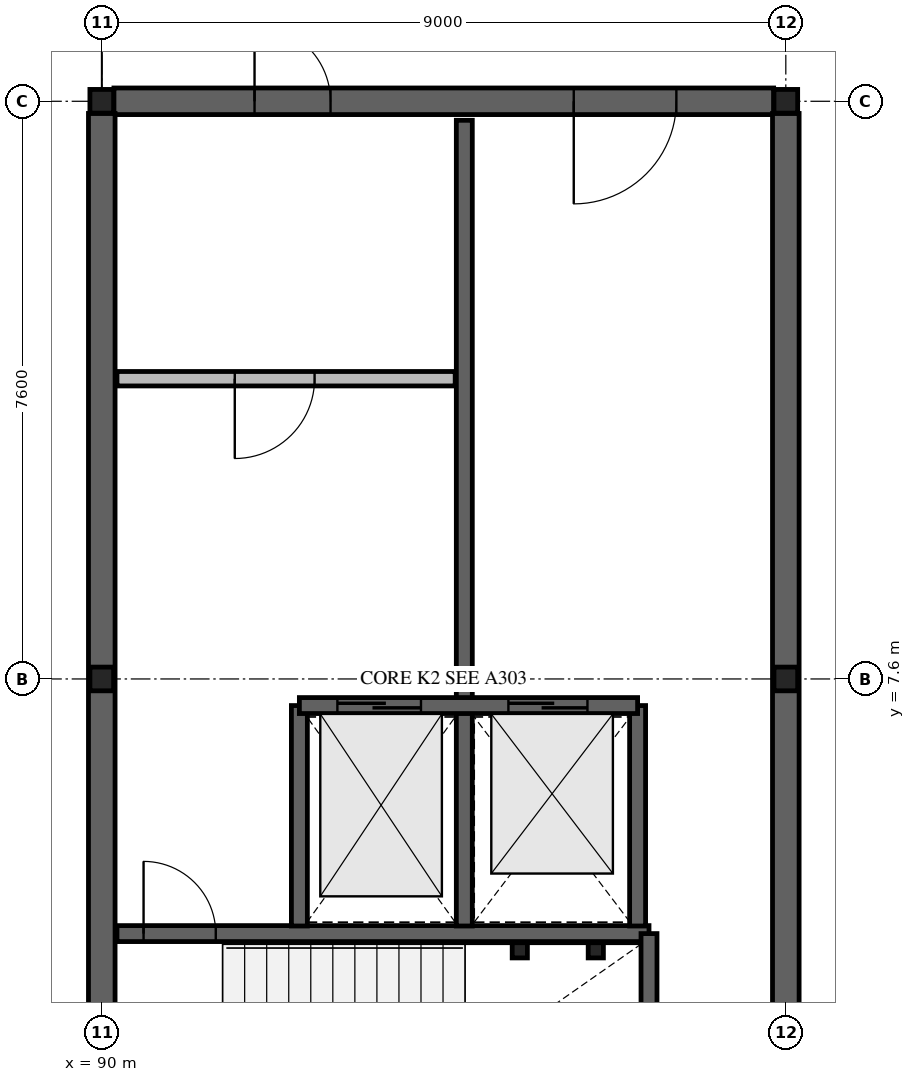
"""IFC4 building model, lengths in metres.
Left out: names, types, materials, properties, quantities, classifications, styles, units other than length and angle.
Written with IfcOpenShell. Run it as: python <this file> out.ifc"""

import sys

from ifc_helpers import new_model, si_unit, direction, frame, frame_2d, origin, origin_2d, place, context, subcontext, project, spatial, rectangle, hollow_rectangle, i_section, extrude, element, fill, save


model = new_model("IFC4")
c1 = context("Model", 3, precision=1e-05, world=origin(), true_north=direction((0.0, 1.0)))
c2 = subcontext(c1, "Body", "Model", "MODEL_VIEW")
j1 = project(units=[si_unit("LENGTHUNIT", "METRE"), si_unit("PLANEANGLEUNIT", "RADIAN")], contexts=[c1])
p1 = place(None, origin())
s1 = spatial("IfcSite", under=j1, at=p1, CompositionType="ELEMENT")
p2 = place(p1, origin())
s2 = spatial("IfcBuilding", under=s1, at=p2, CompositionType="ELEMENT")
p3 = place(p2, frame((0.0, 0.0, 9.36)))
s3 = spatial("IfcBuildingStorey", under=s2, at=p3, CompositionType="ELEMENT", Elevation=9.36)
for number, where, z_axis, x_axis in (
    (1, (90.0, 7.6, 0.0), (0.0, 0.0, 1.0), (1.0, 0.0, 0.0)),
    (2, (90.0, 15.2, 0.0), (0.0, 0.0, 1.0), (1.0, 0.0, 0.0)),
    (3, (99.0, 7.6, 0.0), (0.0, 0.0, 1.0), (1.0, 0.0, 0.0)),
    (4, (99.0, 15.2, 0.0), (0.0, 0.0, 1.0), (1.0, 0.0, 0.0)),
):
    element("IfcColumn", number, at=place(p3, frame(where, z_axis=z_axis, x_axis=x_axis)), inside=s3, PredefinedType="COLUMN", context=c2, shape_type="SweptSolid", body=[
        extrude(i_section(OverallWidth=0.312, OverallDepth=0.312, WebThickness=0.017, FlangeThickness=0.017, FilletRadius=0.015, at=origin_2d()), origin(), (0.0, 0.0, 1.0), 4.32),
    ])
p4 = place(p3, frame((90.16, 15.2, 0.0), z_axis=(0.0, 0.0, 1.0), x_axis=(1.0, 0.0, 0.0)))
e5 = element("IfcWall", 5, at=p4, inside=s3, PredefinedType="SHEAR", context=c2, shape_type="SweptSolid", body=[
    extrude(rectangle(XDim=8.68, YDim=0.35, at=frame_2d((4.34, 0.0))), origin(), (0.0, 0.0, 1.0), 4.04),
])
p5 = place(p4, frame((1.85, 0.0, 0.0)))
e6 = element("IfcOpeningElement", 6, at=p5, cuts=e5, PredefinedType="OPENING", context=c2, shape_type="SweptSolid", body=[
    extrude(rectangle(XDim=1.0, YDim=2.15, at=frame_2d((0.5, 1.075))), frame((0.0, 0.185, 0.0), z_axis=(0.0, -1.0, 0.0), x_axis=(1.0, 0.0, 0.0)), (0.0, 0.0, 1.0), 0.37),
])
p6 = place(p4, frame((6.05, 0.0, 0.0)))
e7 = element("IfcOpeningElement", 7, at=p6, cuts=e5, PredefinedType="OPENING", context=c2, shape_type="SweptSolid", body=[
    extrude(rectangle(XDim=1.35, YDim=2.18, at=frame_2d((0.675, 1.09))), frame((0.0, 0.185, 0.0), z_axis=(0.0, -1.0, 0.0), x_axis=(1.0, 0.0, 0.0)), (0.0, 0.0, 1.0), 0.37),
])
for number, where, z_axis, x_axis in (
    (8, (90.0, 0.16, 0.0), (0.0, 0.0, 1.0), (0.0, 1.0, 0.0)),
    (9, (99.0, 0.16, 0.0), (0.0, 0.0, 1.0), (0.0, 1.0, 0.0)),
):
    element("IfcWall", number, at=place(p3, frame(where, z_axis=z_axis, x_axis=x_axis)), inside=s3, PredefinedType="SHEAR", context=c2, shape_type="SweptSolid", body=[
        extrude(rectangle(XDim=14.88, YDim=0.35, at=frame_2d((7.44, 0.0))), origin(), (0.0, 0.0, 1.0), 4.04),
    ])
p7 = place(p3, frame((90.2, 4.25, 0.0), z_axis=(0.0, 0.0, 1.0), x_axis=(1.0, 0.0, 0.0)))
e10 = element("IfcWall", 10, at=p7, inside=s3, PredefinedType="SOLIDWALL", context=c2, shape_type="SweptSolid", body=[
    extrude(rectangle(XDim=7.0, YDim=0.21, at=frame_2d((3.5, 0.0))), origin(), (0.0, 0.0, 1.0), 4.04),
])
p8 = place(p7, frame((0.35, 0.0, 0.0)))
e11 = element("IfcOpeningElement", 11, at=p8, cuts=e10, PredefinedType="OPENING", context=c2, shape_type="SweptSolid", body=[
    extrude(rectangle(XDim=0.95, YDim=2.12, at=frame_2d((0.475, 1.06))), frame((0.0, 0.115, 0.0), z_axis=(0.0, -1.0, 0.0), x_axis=(1.0, 0.0, 0.0)), (0.0, 0.0, 1.0), 0.23),
])
p9 = place(p3, frame((97.2, 0.2, 0.0), z_axis=(0.0, 0.0, 1.0), x_axis=(0.0, 1.0, 0.0)))
e12 = element("IfcWall", 12, at=p9, inside=s3, PredefinedType="SOLIDWALL", context=c2, shape_type="SweptSolid", body=[
    extrude(rectangle(XDim=4.05, YDim=0.21, at=frame_2d((2.025, 0.0))), origin(), (0.0, 0.0, 1.0), 4.04),
])
p10 = place(p3, frame((92.6, 4.35, 0.0), z_axis=(0.0, 0.0, 1.0), x_axis=(0.0, 1.0, 0.0)))
e13 = element("IfcWall", 13, at=p10, inside=s3, PredefinedType="SOLIDWALL", context=c2, shape_type="SweptSolid", body=[
    extrude(rectangle(XDim=2.9, YDim=0.21, at=frame_2d((1.45, 0.0))), origin(), (0.0, 0.0, 1.0), 4.04),
])
p11 = place(p3, frame((94.77, 4.35, 0.0), z_axis=(0.0, 0.0, 1.0), x_axis=(0.0, 1.0, 0.0)))
e14 = element("IfcWall", 14, at=p11, inside=s3, PredefinedType="SOLIDWALL", context=c2, shape_type="SweptSolid", body=[
    extrude(rectangle(XDim=10.6, YDim=0.21, at=frame_2d((5.3, 0.0))), origin(), (0.0, 0.0, 1.0), 4.04),
])
p12 = place(p3, frame((97.05, 4.35, 0.0), z_axis=(0.0, 0.0, 1.0), x_axis=(0.0, 1.0, 0.0)))
e15 = element("IfcWall", 15, at=p12, inside=s3, PredefinedType="SOLIDWALL", context=c2, shape_type="SweptSolid", body=[
    extrude(rectangle(XDim=2.9, YDim=0.21, at=frame_2d((1.45, 0.0))), origin(), (0.0, 0.0, 1.0), 4.04),
])
p13 = place(p3, frame((92.6, 7.25, 0.0), z_axis=(0.0, 0.0, 1.0), x_axis=(1.0, 0.0, 0.0)))
e16 = element("IfcWall", 16, at=p13, inside=s3, PredefinedType="SOLIDWALL", context=c2, shape_type="SweptSolid", body=[
    extrude(rectangle(XDim=4.45, YDim=0.21, at=frame_2d((2.225, 0.0))), origin(), (0.0, 0.0, 1.0), 4.04),
])
p14 = place(p13, frame((0.5, 0.0, 0.0)))
e17 = element("IfcOpeningElement", 17, at=p14, cuts=e16, PredefinedType="OPENING", context=c2, shape_type="SweptSolid", body=[
    extrude(rectangle(XDim=1.1, YDim=2.14, at=frame_2d((0.55, 1.07))), frame((0.0, 0.115, 0.0), z_axis=(0.0, -1.0, 0.0), x_axis=(1.0, 0.0, 0.0)), (0.0, 0.0, 1.0), 0.23),
])
p15 = place(p13, frame((2.75, 0.0, 0.0)))
e18 = element("IfcOpeningElement", 18, at=p15, cuts=e16, PredefinedType="OPENING", context=c2, shape_type="SweptSolid", body=[
    extrude(rectangle(XDim=1.04, YDim=2.1, at=frame_2d((0.52, 1.05))), frame((0.0, 0.115, 0.0), z_axis=(0.0, -1.0, 0.0), x_axis=(1.0, 0.0, 0.0)), (0.0, 0.0, 1.0), 0.23),
])
p16 = place(p3, frame((90.2, 11.55, 0.0), z_axis=(0.0, 0.0, 1.0), x_axis=(1.0, 0.0, 0.0)))
e19 = element("IfcWall", 19, at=p16, inside=s3, PredefinedType="SOLIDWALL", context=c2, shape_type="SweptSolid", body=[
    extrude(rectangle(XDim=4.45, YDim=0.19, at=frame_2d((2.225, 0.0))), origin(), (0.0, 0.0, 1.0), 4.04),
])
p17 = place(p16, frame((1.55, 0.0, 0.0)))
e20 = element("IfcOpeningElement", 20, at=p17, cuts=e19, PredefinedType="OPENING", context=c2, shape_type="SweptSolid", body=[
    extrude(rectangle(XDim=1.05, YDim=2.12, at=frame_2d((0.525, 1.06))), frame((0.0, 0.105, 0.0), z_axis=(0.0, -1.0, 0.0), x_axis=(1.0, 0.0, 0.0)), (0.0, 0.0, 1.0), 0.21),
])
for number, where, z_axis, x_axis in (
    (21, (95.5, 4.03, 0.0), (0.0, 0.0, 1.0), (1.0, 0.0, 0.0)),
    (22, (96.5, 4.03, 0.0), (0.0, 0.0, 1.0), (1.0, 0.0, 0.0)),
):
    element("IfcColumn", number, at=place(p3, frame(where, z_axis=z_axis, x_axis=x_axis)), inside=s3, PredefinedType="COLUMN", context=c2, shape_type="SweptSolid", body=[
        extrude(hollow_rectangle(XDim=0.2, YDim=0.2, WallThickness=0.012, at=origin_2d()), origin(), (0.0, 0.0, 1.0), 4.32),
    ])
p18 = place(p8, origin())
e23 = element("IfcDoor", 23, at=p18, inside=s3, OperationType="SINGLE_SWING_LEFT", PredefinedType="DOOR", context=c2, shape_type="SweptSolid", body=[
    extrude(rectangle(XDim=0.95, YDim=2.12, at=frame_2d((0.475, 1.06))), frame((0.0, 0.025, 0.0), z_axis=(0.0, -1.0, 0.0), x_axis=(1.0, 0.0, 0.0)), (0.0, 0.0, 1.0), 0.05),
])
fill(e11, e23)
p19 = place(p14, origin())
e24 = element("IfcDoor", 24, at=p19, inside=s3, OperationType="SLIDING_TO_LEFT", PredefinedType="DOOR", context=c2, shape_type="SweptSolid", body=[
    extrude(rectangle(XDim=1.1, YDim=2.14, at=frame_2d((0.55, 1.07))), frame((0.0, 0.025, 0.0), z_axis=(0.0, -1.0, 0.0), x_axis=(1.0, 0.0, 0.0)), (0.0, 0.0, 1.0), 0.05),
])
fill(e17, e24)
p20 = place(p15, origin())
e25 = element("IfcDoor", 25, at=p20, inside=s3, OperationType="SLIDING_TO_LEFT", PredefinedType="DOOR", context=c2, shape_type="SweptSolid", body=[
    extrude(rectangle(XDim=1.04, YDim=2.1, at=frame_2d((0.52, 1.05))), frame((0.0, 0.025, 0.0), z_axis=(0.0, -1.0, 0.0), x_axis=(1.0, 0.0, 0.0)), (0.0, 0.0, 1.0), 0.05),
])
fill(e18, e25)
p21 = place(p17, origin())
e26 = element("IfcDoor", 26, at=p21, inside=s3, OperationType="SINGLE_SWING_RIGHT", PredefinedType="DOOR", context=c2, shape_type="SweptSolid", body=[
    extrude(rectangle(XDim=1.05, YDim=2.12, at=frame_2d((0.525, 1.06))), frame((0.0, 0.025, 0.0), z_axis=(0.0, -1.0, 0.0), x_axis=(1.0, 0.0, 0.0)), (0.0, 0.0, 1.0), 0.05),
])
fill(e20, e26)
p22 = place(p5, origin())
e27 = element("IfcDoor", 27, at=p22, inside=s3, OperationType="SINGLE_SWING_LEFT", PredefinedType="DOOR", context=c2, shape_type="SweptSolid", body=[
    extrude(rectangle(XDim=1.0, YDim=2.15, at=frame_2d((0.5, 1.075))), frame((0.0, 0.025, 0.0), z_axis=(0.0, -1.0, 0.0), x_axis=(1.0, 0.0, 0.0)), (0.0, 0.0, 1.0), 0.05),
])
fill(e6, e27)
p23 = place(p6, origin())
e28 = element("IfcDoor", 28, at=p23, inside=s3, OperationType="SINGLE_SWING_RIGHT", PredefinedType="DOOR", context=c2, shape_type="SweptSolid", body=[
    extrude(rectangle(XDim=1.35, YDim=2.18, at=frame_2d((0.675, 1.09))), frame((0.0, 0.025, 0.0), z_axis=(0.0, -1.0, 0.0), x_axis=(1.0, 0.0, 0.0)), (0.0, 0.0, 1.0), 0.05),
])
fill(e7, e28)
save(model, sys.argv[1])
